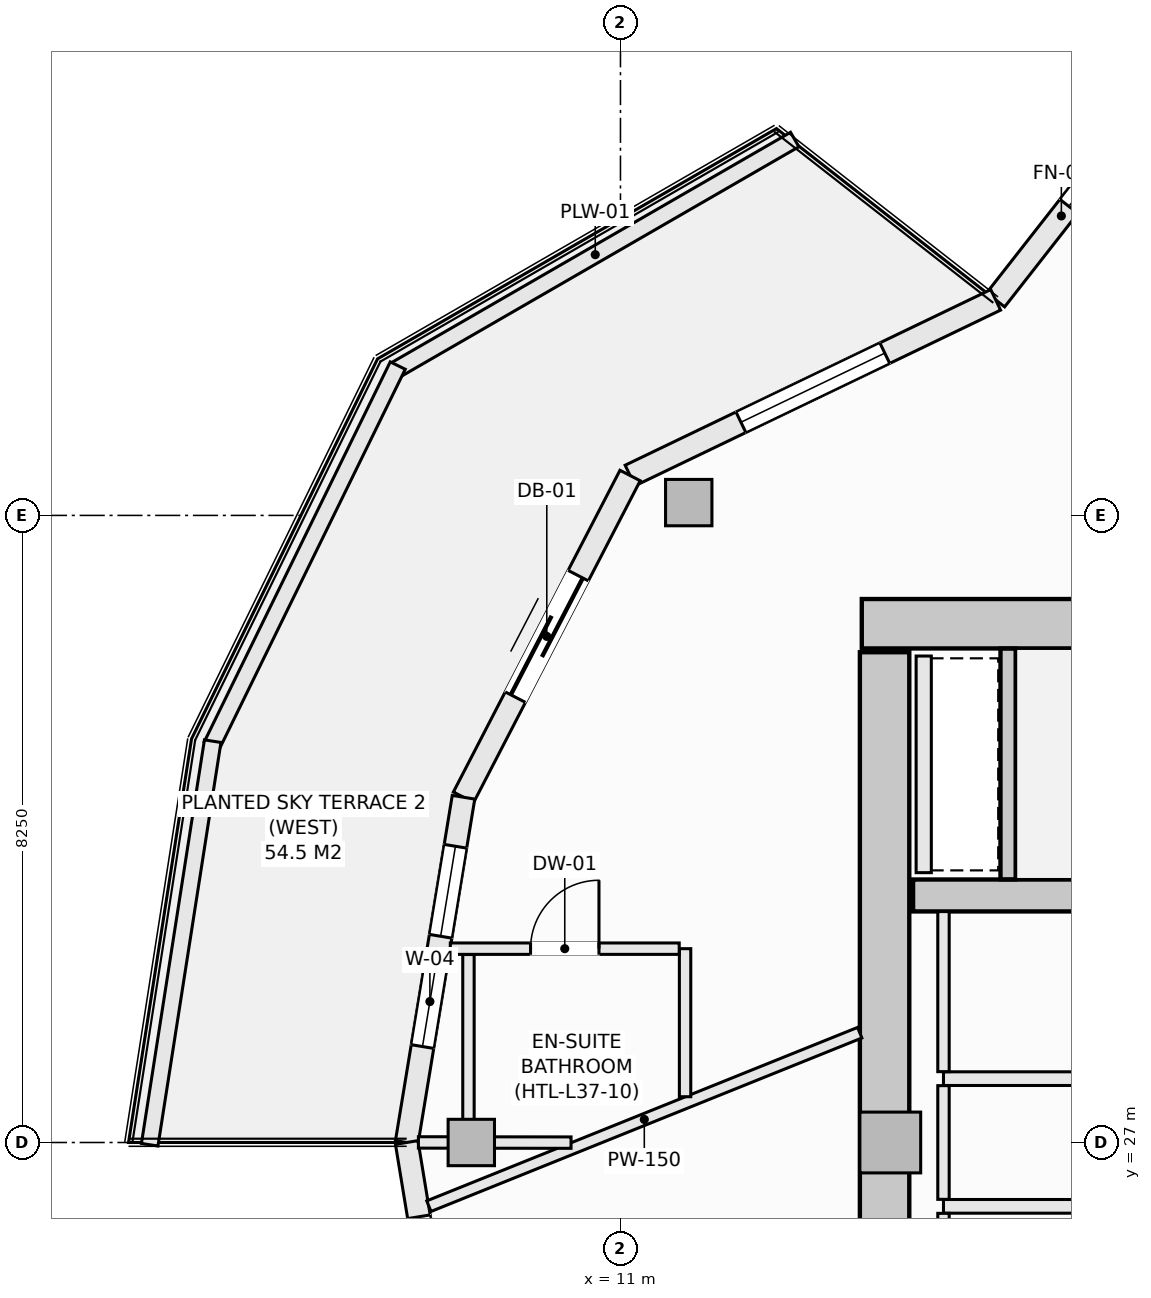
"""IFC4 building model, lengths in metres.
Left out: names, types, materials, properties, quantities, classifications, styles, units other than length and angle.
Written with IfcOpenShell. Run it as: python <this file> out.ifc"""

import sys

from ifc_helpers import new_model, si_unit, direction, frame, frame_2d, origin, origin_2d, place, context, subcontext, project, spatial, rectangle, hollow_rectangle, extrude, element, fill, save


model = new_model("IFC4")
c1 = context("Model", 3, precision=1e-05, world=origin(), true_north=direction((0.0, 1.0)))
c2 = subcontext(c1, "Body", "Model", "MODEL_VIEW")
j1 = project(units=[si_unit("LENGTHUNIT", "METRE"), si_unit("PLANEANGLEUNIT", "RADIAN")], contexts=[c1])
p1 = place(None, origin())
s1 = spatial("IfcSite", under=j1, at=p1, CompositionType="ELEMENT")
p2 = place(p1, origin())
s2 = spatial("IfcBuilding", under=s1, at=p2, CompositionType="ELEMENT")
p3 = place(p2, frame((0.0, 0.0, 146.1)))
s3 = spatial("IfcBuildingStorey", under=s2, at=p3, CompositionType="ELEMENT", Elevation=146.1)
p4 = place(p3, frame((14.175, 33.825, -0.27), z_axis=(0.0, 0.0, 1.0), x_axis=(1.0, 0.0, 0.0)))
e1 = element("IfcWall", 1, at=p4, inside=s3, PredefinedType="SHEAR", context=c2, shape_type="SweptSolid", body=[
    extrude(rectangle(XDim=13.65, YDim=0.65, at=frame_2d((6.825, 0.0))), origin(), (0.0, 0.0, 1.0), 3.4),
])
p5 = place(p3, frame((14.475, 20.55, -0.27), z_axis=(0.0, 0.0, 1.0), x_axis=(0.0, 1.0, 0.0)))
e2 = element("IfcWall", 2, at=p5, inside=s3, PredefinedType="SHEAR", context=c2, shape_type="SweptSolid", body=[
    extrude(rectangle(XDim=12.9, YDim=0.65, at=frame_2d((6.45, 0.0))), origin(), (0.0, 0.0, 1.0), 3.4),
])
p6 = place(p3, frame((14.85, 30.25, -0.27), z_axis=(0.0, 0.0, 1.0), x_axis=(1.0, 0.0, 0.0)))
e3 = element("IfcWall", 3, at=p6, inside=s3, PredefinedType="SHEAR", context=c2, shape_type="SweptSolid", body=[
    extrude(rectangle(XDim=7.3, YDim=0.42, at=frame_2d((3.65, 0.0))), origin(), (0.0, 0.0, 1.0), 3.4),
])
for number, where, z_axis, x_axis in (
    (4, (11.898, 35.419, -0.27), (0.0, 0.0, 1.0), (1.0, 0.0, 0.0)),
    (5, (9.038, 27.0, -0.27), (0.0, 0.0, 1.0), (1.0, 0.0, 0.0)),
):
    element("IfcColumn", number, at=place(p3, frame(where, z_axis=z_axis, x_axis=x_axis)), inside=s3, PredefinedType="COLUMN", context=c2, shape_type="SweptSolid", body=[
        extrude(hollow_rectangle(XDim=0.61, YDim=0.61, WallThickness=0.025, at=origin_2d()), origin(), (0.0, 0.0, 1.0), 3.4),
    ])
p7 = place(p3, frame((14.55, 27.0, -0.27), z_axis=(0.0, 0.0, 1.0), x_axis=(1.0, 0.0, 0.0)))
e6 = element("IfcColumn", 6, at=p7, inside=s3, PredefinedType="PILASTER", context=c2, shape_type="SweptSolid", body=[
    extrude(rectangle(XDim=0.8, YDim=0.8, at=origin_2d()), origin(), (0.0, 0.0, 1.0), 3.4),
])
p8 = place(p3, frame((15.937, 38.086, 0.0), z_axis=(0.0, 0.0, 1.0), x_axis=(0.616429245738, 0.787410302828, 0.0)))
e7 = element("IfcWall", 7, at=p8, inside=s3, PredefinedType="SOLIDWALL", context=c2, shape_type="SweptSolid", body=[
    extrude(rectangle(XDim=5.223, YDim=0.3, at=frame_2d((2.612, 0.0))), origin(), (0.0, 0.0, 1.0), 2.653),
])
p9 = place(p8, frame((1.562, 0.0, 0.74)))
e8 = element("IfcOpeningElement", 8, at=p9, cuts=e7, PredefinedType="OPENING", context=c2, shape_type="SweptSolid", body=[
    extrude(rectangle(XDim=2.1, YDim=1.7, at=frame_2d((1.05, 0.85))), frame((0.0, 0.16, 0.0), z_axis=(0.0, -1.0, 0.0), x_axis=(1.0, 0.0, 0.0)), (0.0, 0.0, 1.0), 0.32),
])
p10 = place(p3, frame((11.127, 35.775, 0.0), z_axis=(0.0, 0.0, 1.0), x_axis=(0.901353070301, 0.433085029363, 0.0)))
e9 = element("IfcWall", 9, at=p10, inside=s3, PredefinedType="SOLIDWALL", context=c2, shape_type="SweptSolid", body=[
    extrude(rectangle(XDim=5.336, YDim=0.3, at=frame_2d((2.668, 0.0))), origin(), (0.0, 0.0, 1.0), 2.653),
])
p11 = place(p10, frame((1.618, 0.0, 0.74)))
e10 = element("IfcOpeningElement", 10, at=p11, cuts=e9, PredefinedType="OPENING", context=c2, shape_type="SweptSolid", body=[
    extrude(rectangle(XDim=2.1, YDim=1.7, at=frame_2d((1.05, 0.85))), frame((0.0, 0.16, 0.0), z_axis=(0.0, -1.0, 0.0), x_axis=(1.0, 0.0, 0.0)), (0.0, 0.0, 1.0), 0.32),
])
p12 = place(p3, frame((8.935, 31.542, 0.0), z_axis=(0.0, 0.0, 1.0), x_axis=(0.459810251451, 0.888017191647, 0.0)))
e11 = element("IfcWall", 11, at=p12, inside=s3, PredefinedType="SOLIDWALL", context=c2, shape_type="SweptSolid", body=[
    extrude(rectangle(XDim=4.766, YDim=0.3, at=frame_2d((2.383, 0.0))), origin(), (0.0, 0.0, 1.0), 2.653),
])
p13 = place(p12, frame((1.483, 0.0, 0.0)))
e12 = element("IfcOpeningElement", 12, at=p13, cuts=e11, PredefinedType="OPENING", context=c2, shape_type="SweptSolid", body=[
    extrude(rectangle(XDim=1.8, YDim=2.25, at=frame_2d((0.9, 1.125))), frame((0.0, 0.16, 0.0), z_axis=(0.0, -1.0, 0.0), x_axis=(1.0, 0.0, 0.0)), (0.0, 0.0, 1.0), 0.32),
])
p14 = place(p3, frame((8.188, 27.0, 0.0), z_axis=(0.0, 0.0, 1.0), x_axis=(0.162394765401, 0.986725868806, 0.0)))
e13 = element("IfcWall", 13, at=p14, inside=s3, PredefinedType="SOLIDWALL", context=c2, shape_type="SweptSolid", body=[
    extrude(rectangle(XDim=4.603, YDim=0.3, at=frame_2d((2.302, 0.0))), origin(), (0.0, 0.0, 1.0), 2.653),
])
p15 = place(p14, frame((1.279, 0.0, 0.72)))
e14 = element("IfcOpeningElement", 14, at=p15, cuts=e13, PredefinedType="OPENING", context=c2, shape_type="SweptSolid", body=[
    extrude(rectangle(XDim=1.2, YDim=1.65, at=frame_2d((0.6, 0.825))), frame((0.0, 0.16, 0.0), z_axis=(0.0, -1.0, 0.0), x_axis=(1.0, 0.0, 0.0)), (0.0, 0.0, 1.0), 0.32),
])
p16 = place(p14, frame((2.75, 0.0, 0.72)))
e15 = element("IfcOpeningElement", 15, at=p16, cuts=e13, PredefinedType="OPENING", context=c2, shape_type="SweptSolid", body=[
    extrude(rectangle(XDim=1.2, YDim=1.65, at=frame_2d((0.6, 0.825))), frame((0.0, 0.16, 0.0), z_axis=(0.0, -1.0, 0.0), x_axis=(1.0, 0.0, 0.0)), (0.0, 0.0, 1.0), 0.32),
])
p17 = place(p3, frame((8.188, 27.0, 0.0), z_axis=(0.0, 0.0, 1.0), x_axis=(0.162394765401, -0.986725868806, 0.0)))
e16 = element("IfcWall", 16, at=p17, inside=s3, PredefinedType="SOLIDWALL", context=c2, shape_type="SweptSolid", body=[
    extrude(rectangle(XDim=4.603, YDim=0.3, at=frame_2d((2.302, 0.0))), origin(), (0.0, 0.0, 1.0), 2.653),
])
p18 = place(p17, frame((0.99, 0.0, 0.74)))
e17 = element("IfcOpeningElement", 17, at=p18, cuts=e16, PredefinedType="OPENING", context=c2, shape_type="SweptSolid", body=[
    extrude(rectangle(XDim=1.2, YDim=1.7, at=frame_2d((0.6, 0.85))), frame((0.0, 0.16, 0.0), z_axis=(0.0, -1.0, 0.0), x_axis=(1.0, 0.0, 0.0)), (0.0, 0.0, 1.0), 0.32),
])
p19 = place(p17, frame((2.454, 0.0, 0.74)))
e18 = element("IfcOpeningElement", 18, at=p19, cuts=e16, PredefinedType="OPENING", context=c2, shape_type="SweptSolid", body=[
    extrude(rectangle(XDim=1.2, YDim=1.7, at=frame_2d((0.6, 0.85))), frame((0.0, 0.16, 0.0), z_axis=(0.0, -1.0, 0.0), x_axis=(1.0, 0.0, 0.0)), (0.0, 0.0, 1.0), 0.32),
])
p20 = place(p3, frame((8.044, 37.166, 0.0), z_axis=(0.0, 0.0, 1.0), x_axis=(0.866058128659, 0.499943314571, 0.0)))
e19 = element("IfcWall", 19, at=p20, inside=s3, PredefinedType="PARAPET", context=c2, shape_type="SweptSolid", body=[
    extrude(rectangle(XDim=6.06, YDim=0.22, at=frame_2d((3.03, 0.0))), origin(), (0.0, 0.0, 1.0), 0.52),
])
p21 = place(p3, frame((5.622, 32.221, 0.0), z_axis=(0.0, 0.0, 1.0), x_axis=(0.439637174641, 0.898175458735, 0.0)))
e20 = element("IfcWall", 20, at=p21, inside=s3, PredefinedType="PARAPET", context=c2, shape_type="SweptSolid", body=[
    extrude(rectangle(XDim=5.567, YDim=0.22, at=frame_2d((2.784, 0.0))), origin(), (0.0, 0.0, 1.0), 0.52),
])
p22 = place(p3, frame((4.806, 26.971, 0.0), z_axis=(0.0, 0.0, 1.0), x_axis=(0.154245214003, 0.988032597619, 0.0)))
e21 = element("IfcWall", 21, at=p22, inside=s3, PredefinedType="PARAPET", context=c2, shape_type="SweptSolid", body=[
    extrude(rectangle(XDim=5.374, YDim=0.22, at=frame_2d((2.687, 0.0))), origin(), (0.0, 0.0, 1.0), 0.52),
])
p23 = place(p3, frame((16.1, 30.462, -0.27), z_axis=(0.0, 0.0, 1.0), x_axis=(0.0, 1.0, 0.0)))
e22 = element("IfcWall", 22, at=p23, inside=s3, PredefinedType="SHEAR", context=c2, shape_type="SweptSolid", body=[
    extrude(rectangle(XDim=3.036, YDim=0.2, at=frame_2d((1.518, 0.0))), origin(), (0.0, 0.0, 1.0), 3.4),
])
p24 = place(p3, frame((14.99, 30.55, 0.0), z_axis=(0.0, 0.0, 1.0), x_axis=(0.0, 1.0, 0.0)))
e23 = element("IfcWall", 23, at=p24, inside=s3, PredefinedType="SOLIDWALL", context=c2, shape_type="SweptSolid", body=[
    extrude(rectangle(XDim=2.85, YDim=0.2, at=frame_2d((1.425, 0.0))), origin(), (0.0, 0.0, 1.0), 3.13),
])
p25 = place(p3, frame((15.25, 27.84, 0.0), z_axis=(0.0, 0.0, 1.0), x_axis=(1.0, 0.0, 0.0)))
e24 = element("IfcWall", 24, at=p25, inside=s3, PredefinedType="SOLIDWALL", context=c2, shape_type="SweptSolid", body=[
    extrude(rectangle(XDim=6.9, YDim=0.18, at=frame_2d((3.45, 0.0))), origin(), (0.0, 0.0, 1.0), 3.13),
])
p26 = place(p25, frame((5.02, 0.0, 0.0)))
e25 = element("IfcOpeningElement", 25, at=p26, cuts=e24, PredefinedType="OPENING", context=c2, shape_type="SweptSolid", body=[
    extrude(rectangle(XDim=0.95, YDim=2.1, at=frame_2d((0.475, 1.05))), frame((0.0, 0.1, 0.0), z_axis=(0.0, -1.0, 0.0), x_axis=(1.0, 0.0, 0.0)), (0.0, 0.0, 1.0), 0.2),
])
p27 = place(p25, frame((1.98, 0.0, 0.0)))
e26 = element("IfcOpeningElement", 26, at=p27, cuts=e24, PredefinedType="OPENING", context=c2, shape_type="SweptSolid", body=[
    extrude(rectangle(XDim=0.95, YDim=2.1, at=frame_2d((0.475, 1.05))), frame((0.0, 0.1, 0.0), z_axis=(0.0, -1.0, 0.0), x_axis=(1.0, 0.0, 0.0)), (0.0, 0.0, 1.0), 0.2),
])
p28 = place(p3, frame((15.25, 26.16, 0.0), z_axis=(0.0, 0.0, 1.0), x_axis=(1.0, 0.0, 0.0)))
e27 = element("IfcWall", 27, at=p28, inside=s3, PredefinedType="SOLIDWALL", context=c2, shape_type="SweptSolid", body=[
    extrude(rectangle(XDim=6.9, YDim=0.18, at=frame_2d((3.45, 0.0))), origin(), (0.0, 0.0, 1.0), 3.13),
])
p29 = place(p28, frame((5.02, 0.0, 0.0)))
e28 = element("IfcOpeningElement", 28, at=p29, cuts=e27, PredefinedType="OPENING", context=c2, shape_type="SweptSolid", body=[
    extrude(rectangle(XDim=0.95, YDim=2.1, at=frame_2d((0.475, 1.05))), frame((0.0, 0.1, 0.0), z_axis=(0.0, -1.0, 0.0), x_axis=(1.0, 0.0, 0.0)), (0.0, 0.0, 1.0), 0.2),
])
p30 = place(p28, frame((1.98, 0.0, 0.0)))
e29 = element("IfcOpeningElement", 29, at=p30, cuts=e27, PredefinedType="OPENING", context=c2, shape_type="SweptSolid", body=[
    extrude(rectangle(XDim=0.95, YDim=2.1, at=frame_2d((0.475, 1.05))), frame((0.0, 0.1, 0.0), z_axis=(0.0, -1.0, 0.0), x_axis=(1.0, 0.0, 0.0)), (0.0, 0.0, 1.0), 0.2),
])
p31 = place(p3, frame((15.25, 23.962, 0.0), z_axis=(0.0, 0.0, 1.0), x_axis=(0.0, 1.0, 0.0)))
e30 = element("IfcWall", 30, at=p31, inside=s3, PredefinedType="PARTITIONING", context=c2, shape_type="SweptSolid", body=[
    extrude(rectangle(XDim=2.106, YDim=0.15, at=frame_2d((1.053, 0.0))), origin(), (0.0, 0.0, 1.0), 3.13),
])
p32 = place(p3, frame((15.25, 26.252, 0.0), z_axis=(0.0, 0.0, 1.0), x_axis=(0.0, 1.0, 0.0)))
e31 = element("IfcWall", 31, at=p32, inside=s3, PredefinedType="PARTITIONING", context=c2, shape_type="SweptSolid", body=[
    extrude(rectangle(XDim=1.496, YDim=0.15, at=frame_2d((0.748, 0.0))), origin(), (0.0, 0.0, 1.0), 3.13),
])
p33 = place(p3, frame((15.25, 27.932, 0.0), z_axis=(0.0, 0.0, 1.0), x_axis=(0.0, 1.0, 0.0)))
e32 = element("IfcWall", 32, at=p33, inside=s3, PredefinedType="PARTITIONING", context=c2, shape_type="SweptSolid", body=[
    extrude(rectangle(XDim=2.106, YDim=0.15, at=frame_2d((1.053, 0.0))), origin(), (0.0, 0.0, 1.0), 3.13),
])
p34 = place(p3, frame((8.479, 26.162, 0.0), z_axis=(0.0, 0.0, 1.0), x_axis=(0.927622844305, 0.373518217392, 0.0)))
e33 = element("IfcWall", 33, at=p34, inside=s3, PredefinedType="PARTITIONING", context=c2, shape_type="SweptSolid", body=[
    extrude(rectangle(XDim=6.111, YDim=0.15, at=frame_2d((3.055, 0.0))), origin(), (0.0, 0.0, 1.0), 2.505),
])
p35 = place(p3, frame((11.85, 27.602, 0.0), z_axis=(0.0, 0.0, 1.0), x_axis=(0.0, 1.0, 0.0)))
e34 = element("IfcWall", 34, at=p35, inside=s3, PredefinedType="PARTITIONING", context=c2, shape_type="SweptSolid", body=[
    extrude(rectangle(XDim=1.948, YDim=0.15, at=frame_2d((0.974, 0.0))), origin(), (0.0, 0.0, 1.0), 3.13),
])
p36 = place(p3, frame((8.761, 29.55, 0.0), z_axis=(0.0, 0.0, 1.0), x_axis=(1.0, 0.0, 0.0)))
e35 = element("IfcWall", 35, at=p36, inside=s3, PredefinedType="PARTITIONING", context=c2, shape_type="SweptSolid", body=[
    extrude(rectangle(XDim=3.012, YDim=0.15, at=frame_2d((1.506, 0.0))), origin(), (0.0, 0.0, 1.0), 3.13),
])
p37 = place(p36, frame((1.056, 0.0, 0.0)))
e36 = element("IfcOpeningElement", 36, at=p37, cuts=e35, PredefinedType="OPENING", context=c2, shape_type="SweptSolid", body=[
    extrude(rectangle(XDim=0.9, YDim=2.1, at=frame_2d((0.45, 1.05))), frame((0.0, 0.085, 0.0), z_axis=(0.0, -1.0, 0.0), x_axis=(1.0, 0.0, 0.0)), (0.0, 0.0, 1.0), 0.17),
])
p38 = place(p3, frame((9.0, 27.0, 0.0), z_axis=(0.0, 0.0, 1.0), x_axis=(0.0, 1.0, 0.0)))
e37 = element("IfcWall", 37, at=p38, inside=s3, PredefinedType="PARTITIONING", context=c2, shape_type="SweptSolid", body=[
    extrude(rectangle(XDim=2.473, YDim=0.15, at=frame_2d((1.236, 0.0))), origin(), (0.0, 0.0, 1.0), 2.653),
])
p39 = place(p3, frame((8.342, 27.001, 0.0), z_axis=(0.0, 0.0, 1.0), x_axis=(0.999998588859, -0.00167996403, 0.0)))
e38 = element("IfcWall", 38, at=p39, inside=s3, PredefinedType="PARTITIONING", context=c2, shape_type="SweptSolid", body=[
    extrude(rectangle(XDim=0.581, YDim=0.15, at=frame_2d((0.291, 0.0))), origin(), (0.0, 0.0, 1.0), 2.702),
])
p40 = place(p3, frame((9.023, 27.0, 0.0), z_axis=(0.0, 0.0, 1.0), x_axis=(0.999999169985, -0.001288421533, 0.0)))
e39 = element("IfcWall", 39, at=p40, inside=s3, PredefinedType="PARTITIONING", context=c2, shape_type="SweptSolid", body=[
    extrude(rectangle(XDim=1.326, YDim=0.15, at=frame_2d((0.663, 0.0))), origin(), (0.0, 0.0, 1.0), 2.505),
])
p41 = place(p9, origin())
e40 = element("IfcWindow", 40, at=p41, inside=s3, PartitioningType="SINGLE_PANEL", PredefinedType="WINDOW", context=c2, shape_type="SweptSolid", body=[
    extrude(rectangle(XDim=2.1, YDim=1.7, at=frame_2d((1.05, 0.85))), frame((0.0, 0.03, 0.0), z_axis=(0.0, -1.0, 0.0), x_axis=(1.0, 0.0, 0.0)), (0.0, 0.0, 1.0), 0.06),
])
fill(e8, e40)
p42 = place(p11, origin())
e41 = element("IfcWindow", 41, at=p42, inside=s3, PartitioningType="SINGLE_PANEL", PredefinedType="WINDOW", context=c2, shape_type="SweptSolid", body=[
    extrude(rectangle(XDim=2.1, YDim=1.7, at=frame_2d((1.05, 0.85))), frame((0.0, 0.03, 0.0), z_axis=(0.0, -1.0, 0.0), x_axis=(1.0, 0.0, 0.0)), (0.0, 0.0, 1.0), 0.06),
])
fill(e10, e41)
p43 = place(p13, origin())
e42 = element("IfcDoor", 42, at=p43, inside=s3, OperationType="SLIDING_TO_LEFT", PredefinedType="DOOR", context=c2, shape_type="SweptSolid", body=[
    extrude(rectangle(XDim=1.8, YDim=2.25, at=frame_2d((0.9, 1.125))), frame((0.0, 0.025, 0.0), z_axis=(0.0, -1.0, 0.0), x_axis=(1.0, 0.0, 0.0)), (0.0, 0.0, 1.0), 0.05),
])
fill(e12, e42)
p44 = place(p15, origin())
e43 = element("IfcWindow", 43, at=p44, inside=s3, PartitioningType="SINGLE_PANEL", PredefinedType="WINDOW", context=c2, shape_type="SweptSolid", body=[
    extrude(rectangle(XDim=1.2, YDim=1.65, at=frame_2d((0.6, 0.825))), frame((0.0, 0.03, 0.0), z_axis=(0.0, -1.0, 0.0), x_axis=(1.0, 0.0, 0.0)), (0.0, 0.0, 1.0), 0.06),
])
fill(e14, e43)
p45 = place(p18, origin())
e44 = element("IfcWindow", 44, at=p45, inside=s3, PartitioningType="SINGLE_PANEL", PredefinedType="WINDOW", context=c2, shape_type="SweptSolid", body=[
    extrude(rectangle(XDim=1.2, YDim=1.7, at=frame_2d((0.6, 0.85))), frame((0.0, 0.03, 0.0), z_axis=(0.0, -1.0, 0.0), x_axis=(1.0, 0.0, 0.0)), (0.0, 0.0, 1.0), 0.06),
])
fill(e17, e44)
p46 = place(p37, origin())
e45 = element("IfcDoor", 45, at=p46, inside=s3, OperationType="SINGLE_SWING_RIGHT", PredefinedType="DOOR", context=c2, shape_type="SweptSolid", body=[
    extrude(rectangle(XDim=0.9, YDim=2.1, at=frame_2d((0.45, 1.05))), frame((0.0, 0.025, 0.0), z_axis=(0.0, -1.0, 0.0), x_axis=(1.0, 0.0, 0.0)), (0.0, 0.0, 1.0), 0.05),
])
fill(e36, e45)
p47 = place(p16, origin())
e46 = element("IfcWindow", 46, at=p47, inside=s3, PartitioningType="SINGLE_PANEL", PredefinedType="WINDOW", context=c2, shape_type="SweptSolid", body=[
    extrude(rectangle(XDim=1.2, YDim=1.65, at=frame_2d((0.6, 0.825))), frame((0.0, 0.03, 0.0), z_axis=(0.0, -1.0, 0.0), x_axis=(1.0, 0.0, 0.0)), (0.0, 0.0, 1.0), 0.06),
])
fill(e15, e46)
save(model, sys.argv[1])
